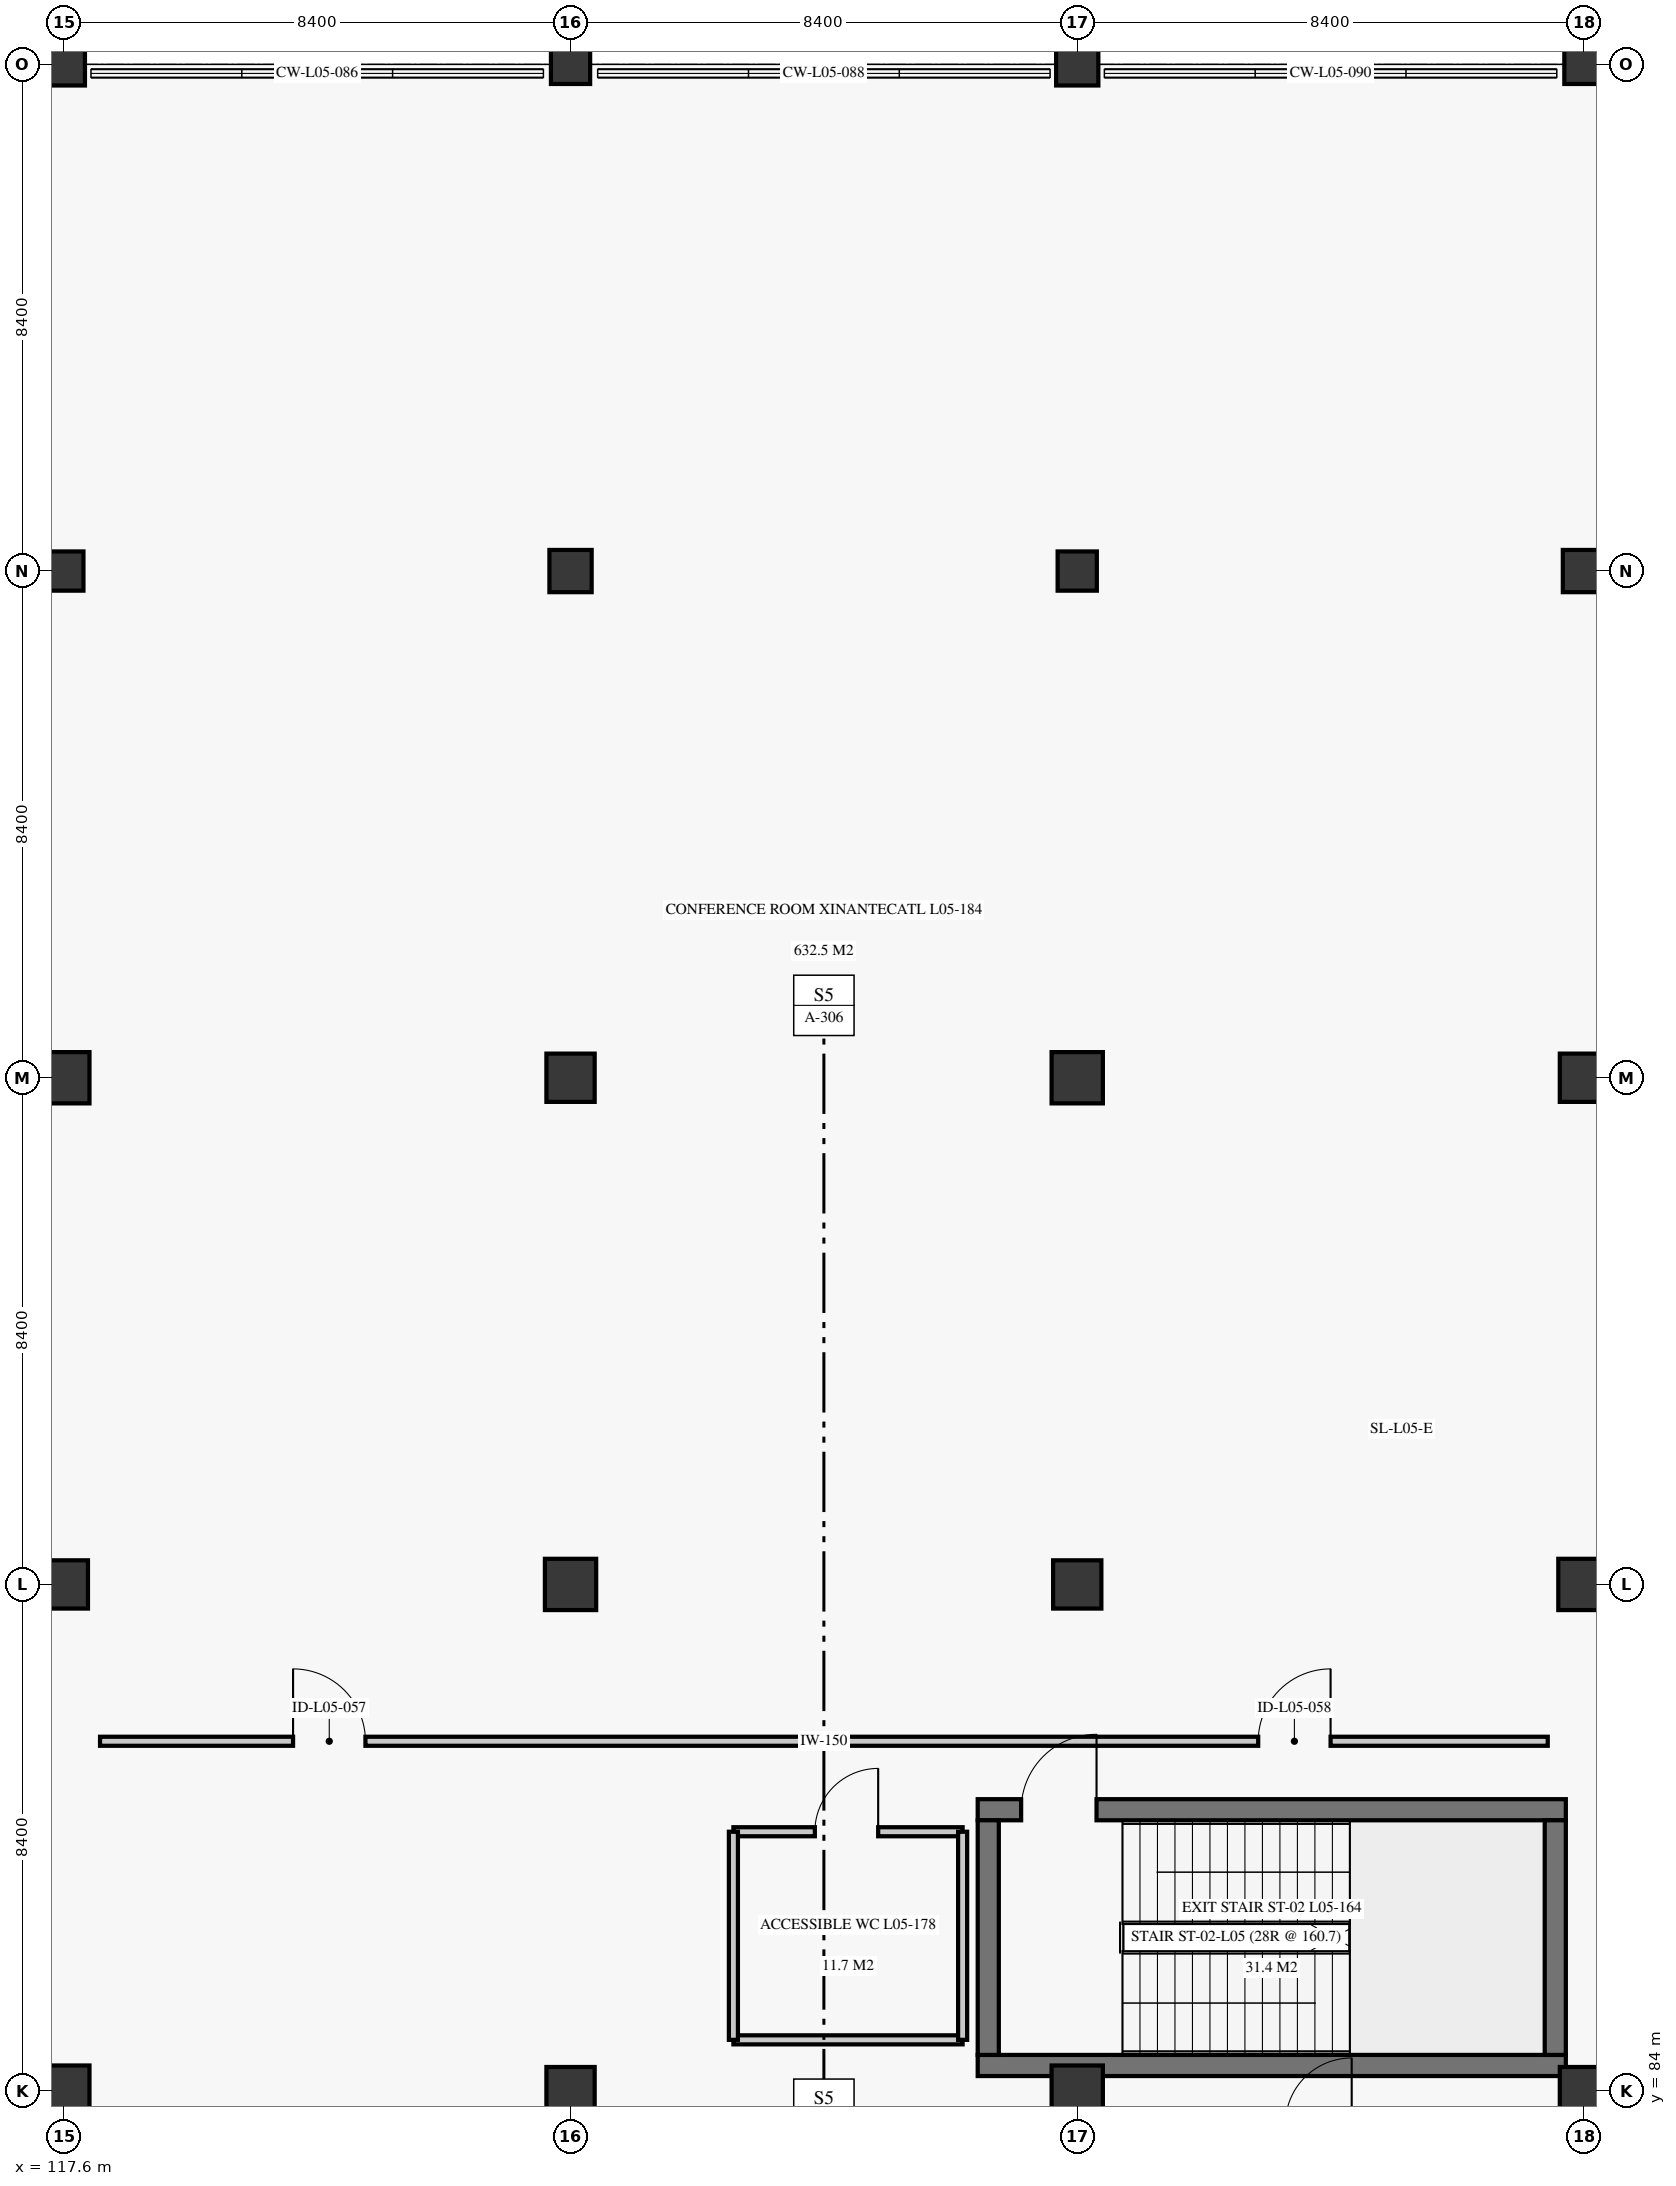
"""IFC4 building model, lengths in metres.
Left out: names, types, materials, properties, quantities, classifications, styles, units other than length and angle.
Written with IfcOpenShell. Run it as: python <this file> out.ifc"""

import sys

from ifc_helpers import new_model, si_unit, direction, frame, frame_2d, origin, origin_2d, place, context, subcontext, project, spatial, rectangle, extrude, element, fill, save


model = new_model("IFC4")
c1 = context("Model", 3, precision=1e-05, world=origin(), true_north=direction((0.0, 1.0)))
c2 = subcontext(c1, "Body", "Model", "MODEL_VIEW")
j1 = project(units=[si_unit("LENGTHUNIT", "METRE"), si_unit("PLANEANGLEUNIT", "RADIAN")], contexts=[c1])
p1 = place(None, origin())
s1 = spatial("IfcSite", under=j1, at=p1, CompositionType="ELEMENT")
p2 = place(p1, origin())
s2 = spatial("IfcBuilding", under=s1, at=p2, CompositionType="ELEMENT")
p3 = place(p2, frame((0.0, 0.0, 22.2)))
s3 = spatial("IfcBuildingStorey", under=s2, at=p3, CompositionType="ELEMENT", Elevation=22.2)
p4 = place(p3, frame((117.6, 84.0, 0.0), z_axis=(0.0, 0.0, 1.0), x_axis=(1.0, 0.0, 0.0)))
e1 = element("IfcColumn", 1, at=p4, inside=s3, PredefinedType="COLUMN", context=c2, shape_type="SweptSolid", body=[
    extrude(rectangle(XDim=0.85, YDim=0.85, at=origin_2d()), origin(), (0.0, 0.0, 1.0), 4.22),
])
p5 = place(p3, frame((117.6, 92.4, 0.0), z_axis=(0.0, 0.0, 1.0), x_axis=(1.0, 0.0, 0.0)))
e2 = element("IfcColumn", 2, at=p5, inside=s3, PredefinedType="COLUMN", context=c2, shape_type="SweptSolid", body=[
    extrude(rectangle(XDim=0.8, YDim=0.8, at=origin_2d()), origin(), (0.0, 0.0, 1.0), 4.22),
])
p6 = place(p3, frame((117.6, 100.8, 0.0), z_axis=(0.0, 0.0, 1.0), x_axis=(1.0, 0.0, 0.0)))
e3 = element("IfcColumn", 3, at=p6, inside=s3, PredefinedType="COLUMN", context=c2, shape_type="SweptSolid", body=[
    extrude(rectangle(XDim=0.85, YDim=0.85, at=origin_2d()), origin(), (0.0, 0.0, 1.0), 4.22),
])
p7 = place(p3, frame((117.6, 109.2, 0.0), z_axis=(0.0, 0.0, 1.0), x_axis=(1.0, 0.0, 0.0)))
e4 = element("IfcColumn", 4, at=p7, inside=s3, PredefinedType="COLUMN", context=c2, shape_type="SweptSolid", body=[
    extrude(rectangle(XDim=0.65, YDim=0.65, at=origin_2d()), origin(), (0.0, 0.0, 1.0), 4.22),
])
p8 = place(p3, frame((117.6, 117.6, 0.0), z_axis=(0.0, 0.0, 1.0), x_axis=(1.0, 0.0, 0.0)))
e5 = element("IfcColumn", 5, at=p8, inside=s3, PredefinedType="COLUMN", context=c2, shape_type="SweptSolid", body=[
    extrude(rectangle(XDim=0.7, YDim=0.7, at=origin_2d()), origin(), (0.0, 0.0, 1.0), 4.22),
])
p9 = place(p3, frame((126.0, 84.0, 0.0), z_axis=(0.0, 0.0, 1.0), x_axis=(1.0, 0.0, 0.0)))
e6 = element("IfcColumn", 6, at=p9, inside=s3, PredefinedType="COLUMN", context=c2, shape_type="SweptSolid", body=[
    extrude(rectangle(XDim=0.8, YDim=0.8, at=origin_2d()), origin(), (0.0, 0.0, 1.0), 4.22),
])
p10 = place(p3, frame((126.0, 92.4, 0.0), z_axis=(0.0, 0.0, 1.0), x_axis=(1.0, 0.0, 0.0)))
e7 = element("IfcColumn", 7, at=p10, inside=s3, PredefinedType="COLUMN", context=c2, shape_type="SweptSolid", body=[
    extrude(rectangle(XDim=0.85, YDim=0.85, at=origin_2d()), origin(), (0.0, 0.0, 1.0), 4.22),
])
p11 = place(p3, frame((126.0, 100.8, 0.0), z_axis=(0.0, 0.0, 1.0), x_axis=(1.0, 0.0, 0.0)))
e8 = element("IfcColumn", 8, at=p11, inside=s3, PredefinedType="COLUMN", context=c2, shape_type="SweptSolid", body=[
    extrude(rectangle(XDim=0.8, YDim=0.8, at=origin_2d()), origin(), (0.0, 0.0, 1.0), 4.22),
])
p12 = place(p3, frame((126.0, 109.2, 0.0), z_axis=(0.0, 0.0, 1.0), x_axis=(1.0, 0.0, 0.0)))
e9 = element("IfcColumn", 9, at=p12, inside=s3, PredefinedType="COLUMN", context=c2, shape_type="SweptSolid", body=[
    extrude(rectangle(XDim=0.7, YDim=0.7, at=origin_2d()), origin(), (0.0, 0.0, 1.0), 4.22),
])
p13 = place(p3, frame((126.0, 117.6, 0.0), z_axis=(0.0, 0.0, 1.0), x_axis=(1.0, 0.0, 0.0)))
e10 = element("IfcColumn", 10, at=p13, inside=s3, PredefinedType="COLUMN", context=c2, shape_type="SweptSolid", body=[
    extrude(rectangle(XDim=0.65, YDim=0.65, at=origin_2d()), origin(), (0.0, 0.0, 1.0), 4.22),
])
p14 = place(p3, frame((134.4, 84.0, 0.0), z_axis=(0.0, 0.0, 1.0), x_axis=(1.0, 0.0, 0.0)))
e11 = element("IfcColumn", 11, at=p14, inside=s3, PredefinedType="COLUMN", context=c2, shape_type="SweptSolid", body=[
    extrude(rectangle(XDim=0.85, YDim=0.85, at=origin_2d()), origin(), (0.0, 0.0, 1.0), 4.22),
])
p15 = place(p3, frame((134.4, 92.4, 0.0), z_axis=(0.0, 0.0, 1.0), x_axis=(1.0, 0.0, 0.0)))
e12 = element("IfcColumn", 12, at=p15, inside=s3, PredefinedType="COLUMN", context=c2, shape_type="SweptSolid", body=[
    extrude(rectangle(XDim=0.8, YDim=0.8, at=origin_2d()), origin(), (0.0, 0.0, 1.0), 4.22),
])
p16 = place(p3, frame((134.4, 100.8, 0.0), z_axis=(0.0, 0.0, 1.0), x_axis=(1.0, 0.0, 0.0)))
e13 = element("IfcColumn", 13, at=p16, inside=s3, PredefinedType="COLUMN", context=c2, shape_type="SweptSolid", body=[
    extrude(rectangle(XDim=0.85, YDim=0.85, at=origin_2d()), origin(), (0.0, 0.0, 1.0), 4.22),
])
p17 = place(p3, frame((134.4, 109.2, 0.0), z_axis=(0.0, 0.0, 1.0), x_axis=(1.0, 0.0, 0.0)))
e14 = element("IfcColumn", 14, at=p17, inside=s3, PredefinedType="COLUMN", context=c2, shape_type="SweptSolid", body=[
    extrude(rectangle(XDim=0.65, YDim=0.65, at=origin_2d()), origin(), (0.0, 0.0, 1.0), 4.22),
])
p18 = place(p3, frame((134.4, 117.6, 0.0), z_axis=(0.0, 0.0, 1.0), x_axis=(1.0, 0.0, 0.0)))
e15 = element("IfcColumn", 15, at=p18, inside=s3, PredefinedType="COLUMN", context=c2, shape_type="SweptSolid", body=[
    extrude(rectangle(XDim=0.7, YDim=0.7, at=origin_2d()), origin(), (0.0, 0.0, 1.0), 4.22),
])
p19 = place(p3, frame((142.8, 84.0, 0.0), z_axis=(0.0, 0.0, 1.0), x_axis=(1.0, 0.0, 0.0)))
e16 = element("IfcColumn", 16, at=p19, inside=s3, PredefinedType="COLUMN", context=c2, shape_type="SweptSolid", body=[
    extrude(rectangle(XDim=0.8, YDim=0.8, at=origin_2d()), origin(), (0.0, 0.0, 1.0), 4.22),
])
p20 = place(p3, frame((142.8, 92.4, 0.0), z_axis=(0.0, 0.0, 1.0), x_axis=(1.0, 0.0, 0.0)))
e17 = element("IfcColumn", 17, at=p20, inside=s3, PredefinedType="COLUMN", context=c2, shape_type="SweptSolid", body=[
    extrude(rectangle(XDim=0.85, YDim=0.85, at=origin_2d()), origin(), (0.0, 0.0, 1.0), 4.22),
])
p21 = place(p3, frame((142.8, 100.8, 0.0), z_axis=(0.0, 0.0, 1.0), x_axis=(1.0, 0.0, 0.0)))
e18 = element("IfcColumn", 18, at=p21, inside=s3, PredefinedType="COLUMN", context=c2, shape_type="SweptSolid", body=[
    extrude(rectangle(XDim=0.8, YDim=0.8, at=origin_2d()), origin(), (0.0, 0.0, 1.0), 4.22),
])
p22 = place(p3, frame((142.8, 109.2, 0.0), z_axis=(0.0, 0.0, 1.0), x_axis=(1.0, 0.0, 0.0)))
e19 = element("IfcColumn", 19, at=p22, inside=s3, PredefinedType="COLUMN", context=c2, shape_type="SweptSolid", body=[
    extrude(rectangle(XDim=0.7, YDim=0.7, at=origin_2d()), origin(), (0.0, 0.0, 1.0), 4.22),
])
p23 = place(p3, frame((142.8, 117.6, 0.0), z_axis=(0.0, 0.0, 1.0), x_axis=(1.0, 0.0, 0.0)))
e20 = element("IfcColumn", 20, at=p23, inside=s3, PredefinedType="COLUMN", context=c2, shape_type="SweptSolid", body=[
    extrude(rectangle(XDim=0.65, YDim=0.65, at=origin_2d()), origin(), (0.0, 0.0, 1.0), 4.22),
])
p24 = place(p3, frame((132.75, 84.425, 0.0), z_axis=(0.0, 0.0, 1.0), x_axis=(1.0, 0.0, 0.0)))
e21 = element("IfcWall", 21, at=p24, inside=s3, PredefinedType="SHEAR", context=c2, shape_type="SweptSolid", body=[
    extrude(rectangle(XDim=9.75, YDim=0.35, at=frame_2d((4.875, 0.0))), origin(), (0.0, 0.0, 1.0), 4.22),
])
p25 = place(p3, frame((132.75, 88.665, 0.0), z_axis=(0.0, 0.0, 1.0), x_axis=(1.0, 0.0, 0.0)))
e22 = element("IfcWall", 22, at=p25, inside=s3, PredefinedType="SHEAR", context=c2, shape_type="SweptSolid", body=[
    extrude(rectangle(XDim=9.75, YDim=0.35, at=frame_2d((4.875, 0.0))), origin(), (0.0, 0.0, 1.0), 4.22),
])
p26 = place(p25, frame((0.72, 0.0, 0.0)))
e23 = element("IfcOpeningElement", 23, at=p26, cuts=e22, PredefinedType="OPENING", context=c2, shape_type="SweptSolid", body=[
    extrude(rectangle(XDim=1.25, YDim=2.2, at=frame_2d((0.625, 1.1))), frame((0.0, 0.185, 0.0), z_axis=(0.0, -1.0, 0.0), x_axis=(1.0, 0.0, 0.0)), (0.0, 0.0, 1.0), 0.37),
])
for number, where, z_axis, x_axis in (
    (24, (132.925, 84.6, 0.0), (0.0, 0.0, 1.0), (0.0, 1.0, 0.0)),
    (25, (142.325, 84.6, 0.0), (0.0, 0.0, 1.0), (0.0, 1.0, 0.0)),
):
    element("IfcWall", number, at=place(p3, frame(where, z_axis=z_axis, x_axis=x_axis)), inside=s3, PredefinedType="SHEAR", context=c2, shape_type="SweptSolid", body=[
        extrude(rectangle(XDim=3.89, YDim=0.35, at=frame_2d((1.945, 0.0))), origin(), (0.0, 0.0, 1.0), 4.22),
    ])
p27 = place(p3, frame((128.7, 88.3, 0.0), z_axis=(0.0, 0.0, 1.0), x_axis=(1.0, 0.0, 0.0)))
e26 = element("IfcWall", 26, at=p27, inside=s3, PredefinedType="PARTITIONING", context=c2, shape_type="SweptSolid", body=[
    extrude(rectangle(XDim=3.8, YDim=0.15, at=frame_2d((1.9, 0.0))), origin(), (0.0, 0.0, 1.0), 3.84),
])
p28 = place(p27, frame((1.35, 0.0, 0.0)))
e27 = element("IfcOpeningElement", 27, at=p28, cuts=e26, PredefinedType="OPENING", context=c2, shape_type="SweptSolid", body=[
    extrude(rectangle(XDim=1.05, YDim=2.15, at=frame_2d((0.525, 1.075))), frame((0.0, 0.085, 0.0), z_axis=(0.0, -1.0, 0.0), x_axis=(1.0, 0.0, 0.0)), (0.0, 0.0, 1.0), 0.17),
])
p29 = place(p3, frame((128.7, 84.85, 0.0), z_axis=(0.0, 0.0, 1.0), x_axis=(1.0, 0.0, 0.0)))
e28 = element("IfcWall", 28, at=p29, inside=s3, PredefinedType="PARTITIONING", context=c2, shape_type="SweptSolid", body=[
    extrude(rectangle(XDim=3.8, YDim=0.15, at=frame_2d((1.9, 0.0))), origin(), (0.0, 0.0, 1.0), 3.84),
])
for number, where, z_axis, x_axis in (
    (29, (128.7, 84.85, 0.0), (0.0, 0.0, 1.0), (0.0, 1.0, 0.0)),
    (30, (132.5, 84.85, 0.0), (0.0, 0.0, 1.0), (0.0, 1.0, 0.0)),
):
    element("IfcWall", number, at=place(p3, frame(where, z_axis=z_axis, x_axis=x_axis)), inside=s3, PredefinedType="PARTITIONING", context=c2, shape_type="SweptSolid", body=[
        extrude(rectangle(XDim=3.45, YDim=0.15, at=frame_2d((1.725, 0.0))), origin(), (0.0, 0.0, 1.0), 3.84),
    ])
p30 = place(p3, frame((118.2, 89.8, 0.0), z_axis=(0.0, 0.0, 1.0), x_axis=(1.0, 0.0, 0.0)))
e31 = element("IfcWall", 31, at=p30, inside=s3, PredefinedType="PARTITIONING", context=c2, shape_type="SweptSolid", body=[
    extrude(rectangle(XDim=24.0, YDim=0.15, at=frame_2d((12.0, 0.0))), origin(), (0.0, 0.0, 1.0), 3.84),
])
p31 = place(p30, frame((3.2, 0.0, 0.0)))
e32 = element("IfcOpeningElement", 32, at=p31, cuts=e31, PredefinedType="OPENING", context=c2, shape_type="SweptSolid", body=[
    extrude(rectangle(XDim=1.2, YDim=2.3, at=frame_2d((0.6, 1.15))), frame((0.0, 0.085, 0.0), z_axis=(0.0, -1.0, 0.0), x_axis=(1.0, 0.0, 0.0)), (0.0, 0.0, 1.0), 0.17),
])
p32 = place(p30, frame((19.2, 0.0, 0.0)))
e33 = element("IfcOpeningElement", 33, at=p32, cuts=e31, PredefinedType="OPENING", context=c2, shape_type="SweptSolid", body=[
    extrude(rectangle(XDim=1.2, YDim=2.3, at=frame_2d((0.6, 1.15))), frame((0.0, 0.085, 0.0), z_axis=(0.0, -1.0, 0.0), x_axis=(1.0, 0.0, 0.0)), (0.0, 0.0, 1.0), 0.17),
])
p33 = place(p26, origin())
e34 = element("IfcDoor", 34, at=p33, inside=s3, OperationType="SINGLE_SWING_RIGHT", PredefinedType="DOOR", context=c2, shape_type="SweptSolid", body=[
    extrude(rectangle(XDim=1.25, YDim=2.2, at=frame_2d((0.625, 1.1))), frame((0.0, 0.025, 0.0), z_axis=(0.0, -1.0, 0.0), x_axis=(1.0, 0.0, 0.0)), (0.0, 0.0, 1.0), 0.05),
])
fill(e23, e34)
p34 = place(p28, origin())
e35 = element("IfcDoor", 35, at=p34, inside=s3, OperationType="SINGLE_SWING_RIGHT", PredefinedType="DOOR", context=c2, shape_type="SweptSolid", body=[
    extrude(rectangle(XDim=1.05, YDim=2.15, at=frame_2d((0.525, 1.075))), frame((0.0, 0.025, 0.0), z_axis=(0.0, -1.0, 0.0), x_axis=(1.0, 0.0, 0.0)), (0.0, 0.0, 1.0), 0.05),
])
fill(e27, e35)
p35 = place(p31, origin())
e36 = element("IfcDoor", 36, at=p35, inside=s3, OperationType="SINGLE_SWING_LEFT", PredefinedType="DOOR", context=c2, shape_type="SweptSolid", body=[
    extrude(rectangle(XDim=1.2, YDim=2.3, at=frame_2d((0.6, 1.15))), frame((0.0, 0.025, 0.0), z_axis=(0.0, -1.0, 0.0), x_axis=(1.0, 0.0, 0.0)), (0.0, 0.0, 1.0), 0.05),
])
fill(e32, e36)
p36 = place(p32, origin())
e37 = element("IfcDoor", 37, at=p36, inside=s3, OperationType="SINGLE_SWING_RIGHT", PredefinedType="DOOR", context=c2, shape_type="SweptSolid", body=[
    extrude(rectangle(XDim=1.2, YDim=2.3, at=frame_2d((0.6, 1.15))), frame((0.0, 0.025, 0.0), z_axis=(0.0, -1.0, 0.0), x_axis=(1.0, 0.0, 0.0)), (0.0, 0.0, 1.0), 0.05),
])
fill(e33, e37)
save(model, sys.argv[1])
